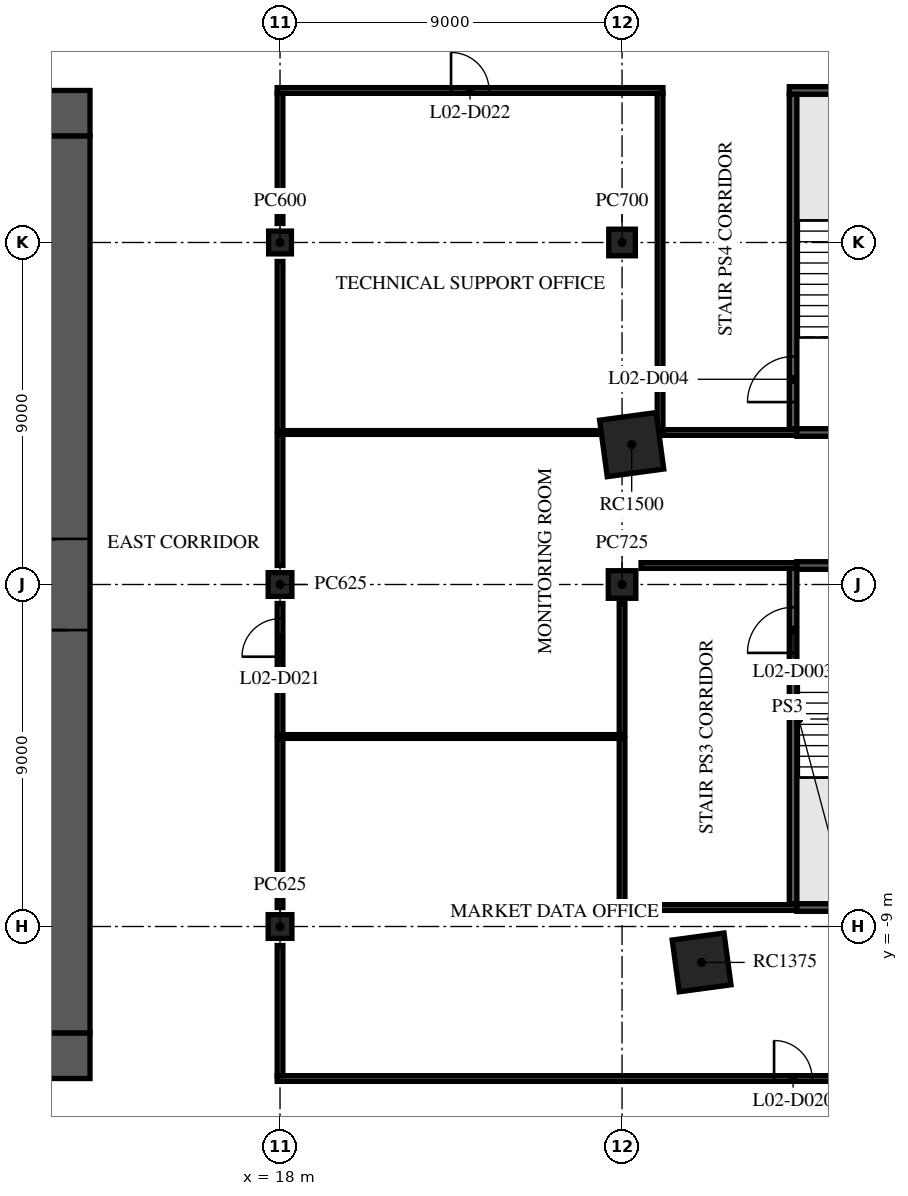
"""IFC4 building model, lengths in metres.
Left out: names, types, materials, properties, quantities, classifications, styles, units other than length and angle.
Written with IfcOpenShell. Run it as: python <this file> out.ifc"""

import sys

from ifc_helpers import new_model, si_unit, direction, frame, frame_2d, origin, origin_2d, place, context, subcontext, project, spatial, rectangle, extrude, element, fill, save


model = new_model("IFC4")
c1 = context("Model", 3, precision=1e-05, world=origin(), true_north=direction((0.0, 1.0)))
c2 = subcontext(c1, "Body", "Model", "MODEL_VIEW")
j1 = project(units=[si_unit("LENGTHUNIT", "METRE"), si_unit("PLANEANGLEUNIT", "RADIAN")], contexts=[c1])
p1 = place(None, origin())
s1 = spatial("IfcSite", under=j1, at=p1, CompositionType="ELEMENT")
p2 = place(p1, origin())
s2 = spatial("IfcBuilding", under=s1, at=p2, CompositionType="ELEMENT")
p3 = place(p2, frame((0.0, 0.0, 9.0)))
s3 = spatial("IfcBuildingStorey", under=s2, at=p3, CompositionType="ELEMENT", Elevation=9.0)
for number, where, z_axis, x_axis in (
    (1, (18.0, -9.0, 0.0), (0.0, 0.0, 1.0), (1.0, 0.0, 0.0)),
    (2, (18.0, 0.0, 0.0), (0.0, 0.0, 1.0), (1.0, 0.0, 0.0)),
):
    element("IfcColumn", number, at=place(p3, frame(where, z_axis=z_axis, x_axis=x_axis)), inside=s3, PredefinedType="COLUMN", context=c2, shape_type="SweptSolid", body=[
        extrude(rectangle(XDim=0.625, YDim=0.625, at=origin_2d()), origin(), (0.0, 0.0, 1.0), 4.5),
    ])
p4 = place(p3, frame((18.0, 9.0, 0.0), z_axis=(0.0, 0.0, 1.0), x_axis=(1.0, 0.0, 0.0)))
e3 = element("IfcColumn", 3, at=p4, inside=s3, PredefinedType="COLUMN", context=c2, shape_type="SweptSolid", body=[
    extrude(rectangle(XDim=0.6, YDim=0.6, at=origin_2d()), origin(), (0.0, 0.0, 1.0), 4.5),
])
p5 = place(p3, frame((27.0, 0.0, 0.0), z_axis=(0.0, 0.0, 1.0), x_axis=(1.0, 0.0, 0.0)))
e4 = element("IfcColumn", 4, at=p5, inside=s3, PredefinedType="COLUMN", context=c2, shape_type="SweptSolid", body=[
    extrude(rectangle(XDim=0.725, YDim=0.725, at=origin_2d()), origin(), (0.0, 0.0, 1.0), 4.5),
])
p6 = place(p3, frame((27.0, 9.0, 0.0), z_axis=(0.0, 0.0, 1.0), x_axis=(1.0, 0.0, 0.0)))
e5 = element("IfcColumn", 5, at=p6, inside=s3, PredefinedType="COLUMN", context=c2, shape_type="SweptSolid", body=[
    extrude(rectangle(XDim=0.7, YDim=0.7, at=origin_2d()), origin(), (0.0, 0.0, 1.0), 4.5),
])
p7 = place(p3, frame((29.093, -9.945, 0.0), z_axis=(0.0, 0.0, 1.0), x_axis=(0.991001197216, 0.133853005627, 0.0)))
e6 = element("IfcColumn", 6, at=p7, inside=s3, PredefinedType="COLUMN", context=c2, shape_type="SweptSolid", body=[
    extrude(rectangle(XDim=1.375, YDim=1.375, at=origin_2d()), origin(), (0.0, 0.0, 1.0), 4.5),
])
p8 = place(p3, frame((27.253, 3.681, 0.0), z_axis=(0.0, 0.0, 1.0), x_axis=(0.991001197216, 0.133853005627, 0.0)))
e7 = element("IfcColumn", 7, at=p8, inside=s3, PredefinedType="COLUMN", context=c2, shape_type="SweptSolid", body=[
    extrude(rectangle(XDim=1.5, YDim=1.5, at=origin_2d()), origin(), (0.0, 0.0, 1.0), 4.5),
])
p9 = place(p3, frame((-13.0, 12.4, 0.0), z_axis=(0.0, 0.0, 1.0), x_axis=(1.0, 0.0, 0.0)))
e8 = element("IfcWall", 8, at=p9, inside=s3, PredefinedType="SHEAR", context=c2, shape_type="SweptSolid", body=[
    extrude(rectangle(XDim=26.0, YDim=1.2, at=frame_2d((13.0, 0.0))), origin(), (0.0, 0.0, 1.0), 4.1),
])
p10 = place(p9, frame((11.8, 0.0, 0.0)))
e9 = element("IfcOpeningElement", 9, at=p10, cuts=e8, PredefinedType="OPENING", context=c2, shape_type="SweptSolid", body=[
    extrude(rectangle(XDim=2.4, YDim=2.4, at=frame_2d((1.2, 1.2))), frame((0.0, 0.61, 0.0), z_axis=(0.0, -1.0, 0.0), x_axis=(1.0, 0.0, 0.0)), (0.0, 0.0, 1.0), 1.22),
])
p11 = place(p9, frame((22.625, 0.0, 0.0)))
e10 = element("IfcOpeningElement", 10, at=p11, cuts=e8, PredefinedType="OPENING", context=c2, shape_type="SweptSolid", body=[
    extrude(rectangle(XDim=1.2, YDim=2.1, at=frame_2d((0.6, 1.05))), frame((0.0, 0.61, 0.0), z_axis=(0.0, -1.0, 0.0), x_axis=(1.0, 0.0, 0.0)), (0.0, 0.0, 1.0), 1.22),
])
p12 = place(p9, frame((1.6, 0.0, 0.0)))
e11 = element("IfcOpeningElement", 11, at=p12, cuts=e8, PredefinedType="OPENING", context=c2, shape_type="SweptSolid", body=[
    extrude(rectangle(XDim=1.0, YDim=2.1, at=frame_2d((0.5, 1.05))), frame((0.0, 0.61, 0.0), z_axis=(0.0, -1.0, 0.0), x_axis=(1.0, 0.0, 0.0)), (0.0, 0.0, 1.0), 1.22),
])
p13 = place(p3, frame((-13.0, -12.4, 0.0), z_axis=(0.0, 0.0, 1.0), x_axis=(1.0, 0.0, 0.0)))
e12 = element("IfcWall", 12, at=p13, inside=s3, PredefinedType="SHEAR", context=c2, shape_type="SweptSolid", body=[
    extrude(rectangle(XDim=26.0, YDim=1.2, at=frame_2d((13.0, 0.0))), origin(), (0.0, 0.0, 1.0), 4.1),
])
p14 = place(p13, frame((7.9, 0.0, 0.0)))
e13 = element("IfcOpeningElement", 13, at=p14, cuts=e12, PredefinedType="OPENING", context=c2, shape_type="SweptSolid", body=[
    extrude(rectangle(XDim=2.0, YDim=2.1, at=frame_2d((1.0, 1.05))), frame((0.0, 0.61, 0.0), z_axis=(0.0, -1.0, 0.0), x_axis=(1.0, 0.0, 0.0)), (0.0, 0.0, 1.0), 1.22),
])
p15 = place(p13, frame((18.025, 0.0, 0.0)))
e14 = element("IfcOpeningElement", 14, at=p15, cuts=e12, PredefinedType="OPENING", context=c2, shape_type="SweptSolid", body=[
    extrude(rectangle(XDim=1.2, YDim=2.1, at=frame_2d((0.6, 1.05))), frame((0.0, 0.61, 0.0), z_axis=(0.0, -1.0, 0.0), x_axis=(1.0, 0.0, 0.0)), (0.0, 0.0, 1.0), 1.22),
])
p16 = place(p13, frame((2.175, 0.0, 0.0)))
e15 = element("IfcOpeningElement", 15, at=p16, cuts=e12, PredefinedType="OPENING", context=c2, shape_type="SweptSolid", body=[
    extrude(rectangle(XDim=1.2, YDim=2.1, at=frame_2d((0.6, 1.05))), frame((0.0, 0.61, 0.0), z_axis=(0.0, -1.0, 0.0), x_axis=(1.0, 0.0, 0.0)), (0.0, 0.0, 1.0), 1.22),
])
p17 = place(p13, frame((22.625, 0.0, 0.0)))
e16 = element("IfcOpeningElement", 16, at=p17, cuts=e12, PredefinedType="OPENING", context=c2, shape_type="SweptSolid", body=[
    extrude(rectangle(XDim=1.2, YDim=2.1, at=frame_2d((0.6, 1.05))), frame((0.0, 0.61, 0.0), z_axis=(0.0, -1.0, 0.0), x_axis=(1.0, 0.0, 0.0)), (0.0, 0.0, 1.0), 1.22),
])
p18 = place(p3, frame((12.4, -11.8, 0.0), z_axis=(0.0, 0.0, 1.0), x_axis=(0.0, 1.0, 0.0)))
e17 = element("IfcWall", 17, at=p18, inside=s3, PredefinedType="SHEAR", context=c2, shape_type="SweptSolid", body=[
    extrude(rectangle(XDim=23.6, YDim=1.2, at=frame_2d((11.8, 0.0))), origin(), (0.0, 0.0, 1.0), 4.1),
])
p19 = place(p18, frame((10.6, 0.0, 0.0)))
e18 = element("IfcOpeningElement", 18, at=p19, cuts=e17, PredefinedType="OPENING", context=c2, shape_type="SweptSolid", body=[
    extrude(rectangle(XDim=2.4, YDim=2.4, at=frame_2d((1.2, 1.2))), frame((0.0, 0.61, 0.0), z_axis=(0.0, -1.0, 0.0), x_axis=(1.0, 0.0, 0.0)), (0.0, 0.0, 1.0), 1.22),
])
p20 = place(p3, frame((17.925, -13.0, 0.0), z_axis=(0.0, 0.0, 1.0), x_axis=(1.0, 0.0, 0.0)))
e19 = element("IfcWall", 19, at=p20, inside=s3, PredefinedType="PARTITIONING", context=c2, shape_type="SweptSolid", body=[
    extrude(rectangle(XDim=18.075, YDim=0.15, at=frame_2d((9.038, 0.0))), origin(), (0.0, 0.0, 1.0), 4.1),
])
p21 = place(p20, frame((13.075, 0.0, 0.0)))
e20 = element("IfcOpeningElement", 20, at=p21, cuts=e19, PredefinedType="OPENING", context=c2, shape_type="SweptSolid", body=[
    extrude(rectangle(XDim=1.0, YDim=2.1, at=frame_2d((0.5, 1.05))), frame((0.0, 0.085, 0.0), z_axis=(0.0, -1.0, 0.0), x_axis=(1.0, 0.0, 0.0)), (0.0, 0.0, 1.0), 0.17),
])
p22 = place(p3, frame((26.925, -8.5, 0.0), z_axis=(0.0, 0.0, 1.0), x_axis=(1.0, 0.0, 0.0)))
e21 = element("IfcWall", 21, at=p22, inside=s3, PredefinedType="PARTITIONING", context=c2, shape_type="SweptSolid", body=[
    extrude(rectangle(XDim=4.675, YDim=0.15, at=frame_2d((2.337, 0.0))), origin(), (0.0, 0.0, 1.0), 4.1),
])
p23 = place(p3, frame((31.6, -8.5, 0.0), z_axis=(0.0, 0.0, 1.0), x_axis=(1.0, 0.0, 0.0)))
e22 = element("IfcWall", 22, at=p23, inside=s3, PredefinedType="PARTITIONING", context=c2, shape_type="SweptSolid", body=[
    extrude(rectangle(XDim=2.5, YDim=0.2, at=frame_2d((1.25, 0.0))), origin(), (0.0, 0.0, 1.0), 4.1),
])
p24 = place(p3, frame((18.075, -4.0, 0.0), z_axis=(0.0, 0.0, 1.0), x_axis=(1.0, 0.0, 0.0)))
e23 = element("IfcWall", 23, at=p24, inside=s3, PredefinedType="PARTITIONING", context=c2, shape_type="SweptSolid", body=[
    extrude(rectangle(XDim=8.85, YDim=0.1, at=frame_2d((4.425, 0.0))), origin(), (0.0, 0.0, 1.0), 4.1),
])
p25 = place(p3, frame((27.5, 0.5, 0.0), z_axis=(0.0, 0.0, 1.0), x_axis=(1.0, 0.0, 0.0)))
e24 = element("IfcWall", 24, at=p25, inside=s3, PredefinedType="PARTITIONING", context=c2, shape_type="SweptSolid", body=[
    extrude(rectangle(XDim=4.1, YDim=0.15, at=frame_2d((2.05, 0.0))), origin(), (0.0, 0.0, 1.0), 4.1),
])
p26 = place(p3, frame((31.6, 0.5, 0.0), z_axis=(0.0, 0.0, 1.0), x_axis=(1.0, 0.0, 0.0)))
e25 = element("IfcWall", 25, at=p26, inside=s3, PredefinedType="PARTITIONING", context=c2, shape_type="SweptSolid", body=[
    extrude(rectangle(XDim=2.5, YDim=0.2, at=frame_2d((1.25, 0.0))), origin(), (0.0, 0.0, 1.0), 4.1),
])
p27 = place(p3, frame((18.075, 4.0, 0.0), z_axis=(0.0, 0.0, 1.0), x_axis=(1.0, 0.0, 0.0)))
e26 = element("IfcWall", 26, at=p27, inside=s3, PredefinedType="PARTITIONING", context=c2, shape_type="SweptSolid", body=[
    extrude(rectangle(XDim=8.447, YDim=0.1, at=frame_2d((4.223, 0.0))), origin(), (0.0, 0.0, 1.0), 4.1),
])
p28 = place(p3, frame((28.075, 4.0, 0.0), z_axis=(0.0, 0.0, 1.0), x_axis=(1.0, 0.0, 0.0)))
e27 = element("IfcWall", 27, at=p28, inside=s3, PredefinedType="PARTITIONING", context=c2, shape_type="SweptSolid", body=[
    extrude(rectangle(XDim=3.525, YDim=0.15, at=frame_2d((1.763, 0.0))), origin(), (0.0, 0.0, 1.0), 4.1),
])
p29 = place(p3, frame((31.6, 4.0, 0.0), z_axis=(0.0, 0.0, 1.0), x_axis=(1.0, 0.0, 0.0)))
e28 = element("IfcWall", 28, at=p29, inside=s3, PredefinedType="PARTITIONING", context=c2, shape_type="SweptSolid", body=[
    extrude(rectangle(XDim=4.4, YDim=0.2, at=frame_2d((2.2, 0.0))), origin(), (0.0, 0.0, 1.0), 4.1),
])
p30 = place(p3, frame((17.925, 13.0, 0.0), z_axis=(0.0, 0.0, 1.0), x_axis=(1.0, 0.0, 0.0)))
e29 = element("IfcWall", 29, at=p30, inside=s3, PredefinedType="PARTITIONING", context=c2, shape_type="SweptSolid", body=[
    extrude(rectangle(XDim=10.15, YDim=0.15, at=frame_2d((5.075, 0.0))), origin(), (0.0, 0.0, 1.0), 4.1),
])
p31 = place(p30, frame((4.575, 0.0, 0.0)))
e30 = element("IfcOpeningElement", 30, at=p31, cuts=e29, PredefinedType="OPENING", context=c2, shape_type="SweptSolid", body=[
    extrude(rectangle(XDim=1.0, YDim=2.1, at=frame_2d((0.5, 1.05))), frame((0.0, 0.085, 0.0), z_axis=(0.0, -1.0, 0.0), x_axis=(1.0, 0.0, 0.0)), (0.0, 0.0, 1.0), 0.17),
])
p32 = place(p3, frame((31.4, 13.0, 0.0), z_axis=(0.0, 0.0, 1.0), x_axis=(1.0, 0.0, 0.0)))
e31 = element("IfcWall", 31, at=p32, inside=s3, PredefinedType="PARTITIONING", context=c2, shape_type="SweptSolid", body=[
    extrude(rectangle(XDim=4.6, YDim=0.2, at=frame_2d((2.3, 0.0))), origin(), (0.0, 0.0, 1.0), 4.1),
])
p33 = place(p3, frame((18.0, -12.925, 0.0), z_axis=(0.0, 0.0, 1.0), x_axis=(0.0, 1.0, 0.0)))
e32 = element("IfcWall", 32, at=p33, inside=s3, PredefinedType="PARTITIONING", context=c2, shape_type="SweptSolid", body=[
    extrude(rectangle(XDim=3.425, YDim=0.15, at=frame_2d((1.712, 0.0))), origin(), (0.0, 0.0, 1.0), 4.1),
])
p34 = place(p3, frame((18.0, -8.5, 0.0), z_axis=(0.0, 0.0, 1.0), x_axis=(0.0, 1.0, 0.0)))
e33 = element("IfcWall", 33, at=p34, inside=s3, PredefinedType="PARTITIONING", context=c2, shape_type="SweptSolid", body=[
    extrude(rectangle(XDim=4.45, YDim=0.15, at=frame_2d((2.225, 0.0))), origin(), (0.0, 0.0, 1.0), 4.1),
])
p35 = place(p3, frame((18.0, -3.95, 0.0), z_axis=(0.0, 0.0, 1.0), x_axis=(0.0, 1.0, 0.0)))
e34 = element("IfcWall", 34, at=p35, inside=s3, PredefinedType="PARTITIONING", context=c2, shape_type="SweptSolid", body=[
    extrude(rectangle(XDim=3.45, YDim=0.15, at=frame_2d((1.725, 0.0))), origin(), (0.0, 0.0, 1.0), 4.1),
])
p36 = place(p35, frame((2.05, 0.0, 0.0)))
e35 = element("IfcOpeningElement", 35, at=p36, cuts=e34, PredefinedType="OPENING", context=c2, shape_type="SweptSolid", body=[
    extrude(rectangle(XDim=1.0, YDim=2.1, at=frame_2d((0.5, 1.05))), frame((0.0, 0.085, 0.0), z_axis=(0.0, -1.0, 0.0), x_axis=(1.0, 0.0, 0.0)), (0.0, 0.0, 1.0), 0.17),
])
p37 = place(p3, frame((18.0, 0.5, 0.0), z_axis=(0.0, 0.0, 1.0), x_axis=(0.0, 1.0, 0.0)))
e36 = element("IfcWall", 36, at=p37, inside=s3, PredefinedType="PARTITIONING", context=c2, shape_type="SweptSolid", body=[
    extrude(rectangle(XDim=3.45, YDim=0.15, at=frame_2d((1.725, 0.0))), origin(), (0.0, 0.0, 1.0), 4.1),
])
p38 = place(p3, frame((18.0, 4.05, 0.0), z_axis=(0.0, 0.0, 1.0), x_axis=(0.0, 1.0, 0.0)))
e37 = element("IfcWall", 37, at=p38, inside=s3, PredefinedType="PARTITIONING", context=c2, shape_type="SweptSolid", body=[
    extrude(rectangle(XDim=4.45, YDim=0.15, at=frame_2d((2.225, 0.0))), origin(), (0.0, 0.0, 1.0), 4.1),
])
p39 = place(p3, frame((18.0, 9.5, 0.0), z_axis=(0.0, 0.0, 1.0), x_axis=(0.0, 1.0, 0.0)))
e38 = element("IfcWall", 38, at=p39, inside=s3, PredefinedType="PARTITIONING", context=c2, shape_type="SweptSolid", body=[
    extrude(rectangle(XDim=3.425, YDim=0.15, at=frame_2d((1.712, 0.0))), origin(), (0.0, 0.0, 1.0), 4.1),
])
p40 = place(p3, frame((27.0, -8.425, 0.0), z_axis=(0.0, 0.0, 1.0), x_axis=(0.0, 1.0, 0.0)))
e39 = element("IfcWall", 39, at=p40, inside=s3, PredefinedType="PARTITIONING", context=c2, shape_type="SweptSolid", body=[
    extrude(rectangle(XDim=4.375, YDim=0.15, at=frame_2d((2.188, 0.0))), origin(), (0.0, 0.0, 1.0), 4.1),
])
p41 = place(p3, frame((27.0, -3.95, 0.0), z_axis=(0.0, 0.0, 1.0), x_axis=(0.0, 1.0, 0.0)))
e40 = element("IfcWall", 40, at=p41, inside=s3, PredefinedType="PARTITIONING", context=c2, shape_type="SweptSolid", body=[
    extrude(rectangle(XDim=3.45, YDim=0.15, at=frame_2d((1.725, 0.0))), origin(), (0.0, 0.0, 1.0), 4.1),
])
p42 = place(p3, frame((28.0, 4.075, 0.0), z_axis=(0.0, 0.0, 1.0), x_axis=(0.0, 1.0, 0.0)))
e41 = element("IfcWall", 41, at=p42, inside=s3, PredefinedType="PARTITIONING", context=c2, shape_type="SweptSolid", body=[
    extrude(rectangle(XDim=8.85, YDim=0.15, at=frame_2d((4.425, 0.0))), origin(), (0.0, 0.0, 1.0), 4.1),
])
p43 = place(p3, frame((31.5, -8.4, 0.0), z_axis=(0.0, 0.0, 1.0), x_axis=(0.0, 1.0, 0.0)))
e42 = element("IfcWall", 42, at=p43, inside=s3, PredefinedType="PARTITIONING", context=c2, shape_type="SweptSolid", body=[
    extrude(rectangle(XDim=8.825, YDim=0.2, at=frame_2d((4.413, 0.0))), origin(), (0.0, 0.0, 1.0), 4.1),
])
p44 = place(p43, frame((6.6, 0.0, 0.0)))
e43 = element("IfcOpeningElement", 43, at=p44, cuts=e42, PredefinedType="OPENING", context=c2, shape_type="SweptSolid", body=[
    extrude(rectangle(XDim=1.2, YDim=2.1, at=frame_2d((0.6, 1.05))), frame((0.0, 0.11, 0.0), z_axis=(0.0, -1.0, 0.0), x_axis=(1.0, 0.0, 0.0)), (0.0, 0.0, 1.0), 0.22),
])
p45 = place(p3, frame((31.5, 4.1, 0.0), z_axis=(0.0, 0.0, 1.0), x_axis=(0.0, 1.0, 0.0)))
e44 = element("IfcWall", 44, at=p45, inside=s3, PredefinedType="PARTITIONING", context=c2, shape_type="SweptSolid", body=[
    extrude(rectangle(XDim=8.8, YDim=0.2, at=frame_2d((4.4, 0.0))), origin(), (0.0, 0.0, 1.0), 4.1),
])
p46 = place(p45, frame((0.7, 0.0, 0.0)))
e45 = element("IfcOpeningElement", 45, at=p46, cuts=e44, PredefinedType="OPENING", context=c2, shape_type="SweptSolid", body=[
    extrude(rectangle(XDim=1.2, YDim=2.1, at=frame_2d((0.6, 1.05))), frame((0.0, 0.11, 0.0), z_axis=(0.0, -1.0, 0.0), x_axis=(1.0, 0.0, 0.0)), (0.0, 0.0, 1.0), 0.22),
])
p47 = place(p19, origin())
e46 = element("IfcDoor", 46, at=p47, inside=s3, OperationType="SINGLE_SWING_LEFT", PredefinedType="DOOR", context=c2, shape_type="SweptSolid", body=[
    extrude(rectangle(XDim=2.4, YDim=2.4, at=frame_2d((1.2, 1.2))), frame((0.0, 0.025, 0.0), z_axis=(0.0, -1.0, 0.0), x_axis=(1.0, 0.0, 0.0)), (0.0, 0.0, 1.0), 0.05),
])
fill(e18, e46)
p48 = place(p44, frame((1.2, 0.0, 0.0), z_axis=(0.0, 0.0, 1.0), x_axis=(-1.0, 0.0, 0.0)))
e47 = element("IfcDoor", 47, at=p48, inside=s3, OperationType="SINGLE_SWING_LEFT", PredefinedType="DOOR", context=c2, shape_type="SweptSolid", body=[
    extrude(rectangle(XDim=1.2, YDim=2.1, at=frame_2d((0.6, 1.05))), frame((0.0, 0.025, 0.0), z_axis=(0.0, -1.0, 0.0), x_axis=(1.0, 0.0, 0.0)), (0.0, 0.0, 1.0), 0.05),
])
fill(e43, e47)
p49 = place(p46, frame((1.2, 0.0, 0.0), z_axis=(0.0, 0.0, 1.0), x_axis=(-1.0, 0.0, 0.0)))
e48 = element("IfcDoor", 48, at=p49, inside=s3, OperationType="SINGLE_SWING_RIGHT", PredefinedType="DOOR", context=c2, shape_type="SweptSolid", body=[
    extrude(rectangle(XDim=1.2, YDim=2.1, at=frame_2d((0.6, 1.05))), frame((0.0, 0.025, 0.0), z_axis=(0.0, -1.0, 0.0), x_axis=(1.0, 0.0, 0.0)), (0.0, 0.0, 1.0), 0.05),
])
fill(e45, e48)
p50 = place(p21, origin())
e49 = element("IfcDoor", 49, at=p50, inside=s3, OperationType="SINGLE_SWING_RIGHT", PredefinedType="DOOR", context=c2, shape_type="SweptSolid", body=[
    extrude(rectangle(XDim=1.0, YDim=2.1, at=frame_2d((0.5, 1.05))), frame((0.0, 0.025, 0.0), z_axis=(0.0, -1.0, 0.0), x_axis=(1.0, 0.0, 0.0)), (0.0, 0.0, 1.0), 0.05),
])
fill(e20, e49)
p51 = place(p36, origin())
e50 = element("IfcDoor", 50, at=p51, inside=s3, OperationType="SINGLE_SWING_LEFT", PredefinedType="DOOR", context=c2, shape_type="SweptSolid", body=[
    extrude(rectangle(XDim=1.0, YDim=2.1, at=frame_2d((0.5, 1.05))), frame((0.0, 0.025, 0.0), z_axis=(0.0, -1.0, 0.0), x_axis=(1.0, 0.0, 0.0)), (0.0, 0.0, 1.0), 0.05),
])
fill(e35, e50)
p52 = place(p31, origin())
e51 = element("IfcDoor", 51, at=p52, inside=s3, OperationType="SINGLE_SWING_RIGHT", PredefinedType="DOOR", context=c2, shape_type="SweptSolid", body=[
    extrude(rectangle(XDim=1.0, YDim=2.1, at=frame_2d((0.5, 1.05))), frame((0.0, 0.025, 0.0), z_axis=(0.0, -1.0, 0.0), x_axis=(1.0, 0.0, 0.0)), (0.0, 0.0, 1.0), 0.05),
])
fill(e30, e51)
save(model, sys.argv[1])
